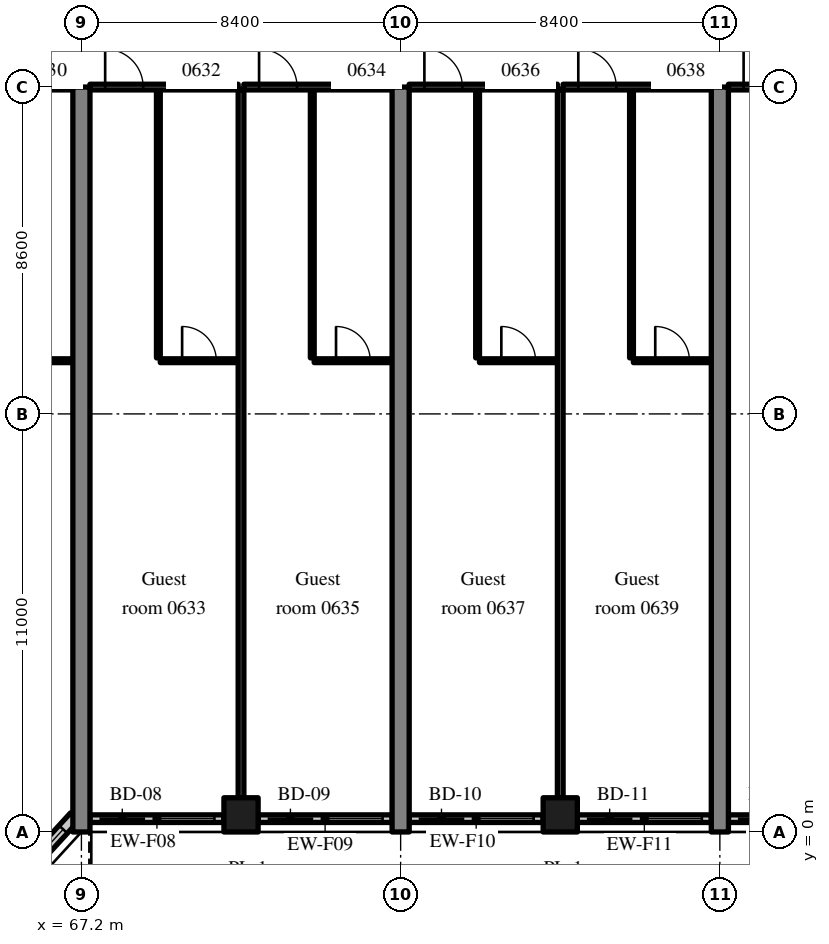
"""IFC4 building model, lengths in metres.
Left out: names, types, materials, properties, quantities, classifications, styles, units other than length and angle.
Written with IfcOpenShell. Run it as: python <this file> out.ifc"""

import sys

from ifc_helpers import new_model, si_unit, direction, frame, frame_2d, origin, origin_2d, place, context, subcontext, project, spatial, rectangle, extrude, source, transform, mapped, element, fill, save


model = new_model("IFC4")
c1 = context("Model", 3, precision=1e-05, world=origin(), true_north=direction((0.0, 1.0)))
c2 = subcontext(c1, "Body", "Model", "MODEL_VIEW")
j1 = project(units=[si_unit("LENGTHUNIT", "METRE"), si_unit("PLANEANGLEUNIT", "RADIAN")], contexts=[c1])
p1 = place(None, origin())
s1 = spatial("IfcSite", under=j1, at=p1, CompositionType="ELEMENT")
p2 = place(p1, origin())
s2 = spatial("IfcBuilding", under=s1, at=p2, CompositionType="ELEMENT")
p3 = place(p2, frame((0.0, 0.0, 31.6)))
s3 = spatial("IfcBuildingStorey", under=s2, at=p3, CompositionType="ELEMENT", Elevation=31.6)
m1 = source(origin(), c2, "Body", "SweptSolid", [
    extrude(rectangle(XDim=19.6, YDim=0.45, at=frame_2d((9.8, 0.0))), origin(), (0.0, 0.0, 1.0), 3.52),
])
for number, where, z_axis, x_axis in (
    (1, (67.2, 0.0, 0.0), (0.0, 0.0, 1.0), (0.0, 1.0, 0.0)),
    (2, (75.6, 0.0, 0.0), (0.0, 0.0, 1.0), (0.0, 1.0, 0.0)),
    (3, (84.0, 0.0, 0.0), (0.0, 0.0, 1.0), (0.0, 1.0, 0.0)),
):
    element("IfcWall", number, at=place(p3, frame(where, z_axis=z_axis, x_axis=x_axis)), inside=s3, PredefinedType="SHEAR", context=c2, shape_type="MappedRepresentation", body=[
        mapped(m1, transform((0.0, 0.0, 0.0), scale=1.0)),
    ])
m2 = source(origin(), c2, "Body", "SweptSolid", [
    extrude(rectangle(XDim=0.9, YDim=0.9, at=origin_2d()), origin(), (0.0, 0.0, 1.0), 3.52),
])
for number, where, z_axis, x_axis in (
    (4, (71.4, 0.45, 0.0), (0.0, 0.0, 1.0), (1.0, 0.0, 0.0)),
    (5, (79.8, 0.45, 0.0), (0.0, 0.0, 1.0), (1.0, 0.0, 0.0)),
):
    element("IfcColumn", number, at=place(p3, frame(where, z_axis=z_axis, x_axis=x_axis)), inside=s3, PredefinedType="COLUMN", context=c2, shape_type="MappedRepresentation", body=[
        mapped(m2, transform((0.0, 0.0, 0.0), scale=1.0)),
    ])
m3 = source(origin(), c2, "Body", "SweptSolid", [
    extrude(rectangle(XDim=2.398, YDim=0.3, at=frame_2d((1.199, 0.0))), origin(), (0.0, 0.0, 1.0), 3.52),
])
p4 = place(p3, frame((65.404, -1.369, 0.0), z_axis=(0.0, 0.0, 1.0), x_axis=(0.675374189419, 0.737475222815, 0.0)))
e6 = element("IfcWall", 6, at=p4, inside=s3, PredefinedType="SOLIDWALL", context=c2, shape_type="MappedRepresentation", body=[
    mapped(m3, transform((0.0, 0.0, 0.0), scale=1.0)),
])
m4 = source(origin(), c2, "Body", "SweptSolid", [
    extrude(rectangle(XDim=1.5, YDim=2.0, at=frame_2d((0.75, 1.0))), frame((0.0, 0.16, 0.0), z_axis=(0.0, -1.0, 0.0), x_axis=(1.0, 0.0, 0.0)), (0.0, 0.0, 1.0), 0.32),
])
p5 = place(p4, frame((0.449, 0.0, 0.9)))
e7 = element("IfcOpeningElement", 7, at=p5, cuts=e6, PredefinedType="OPENING", context=c2, shape_type="MappedRepresentation", body=[
    mapped(m4, transform((0.0, 0.0, 0.0), scale=1.0)),
])
m5 = source(origin(), c2, "Body", "SweptSolid", [
    extrude(rectangle(XDim=3.525, YDim=0.2, at=frame_2d((1.762, 0.0))), origin(), (0.0, 0.0, 1.0), 2.77),
])
p6 = place(p3, frame((67.425, 0.35, 0.0), z_axis=(0.0, 0.0, 1.0), x_axis=(1.0, 0.0, 0.0)))
e8 = element("IfcWall", 8, at=p6, inside=s3, PredefinedType="SOLIDWALL", context=c2, shape_type="MappedRepresentation", body=[
    mapped(m5, transform((0.0, 0.0, 0.0), scale=1.0)),
])
m6 = source(origin(), c2, "Body", "SweptSolid", [
    extrude(rectangle(XDim=1.2, YDim=2.4, at=frame_2d((0.6, 1.2))), frame((0.0, 0.11, 0.0), z_axis=(0.0, -1.0, 0.0), x_axis=(1.0, 0.0, 0.0)), (0.0, 0.0, 1.0), 0.22),
])
p7 = place(p6, frame((0.25, 0.0, 0.0)))
e9 = element("IfcOpeningElement", 9, at=p7, cuts=e8, PredefinedType="OPENING", context=c2, shape_type="MappedRepresentation", body=[
    mapped(m6, transform((0.0, 0.0, 0.0), scale=1.0)),
])
m7 = source(origin(), c2, "Body", "SweptSolid", [
    extrude(rectangle(XDim=1.5, YDim=1.5, at=frame_2d((0.75, 0.75))), frame((0.0, 0.11, 0.0), z_axis=(0.0, -1.0, 0.0), x_axis=(1.0, 0.0, 0.0)), (0.0, 0.0, 1.0), 0.22),
])
p8 = place(p6, frame((1.775, 0.0, 0.9)))
e10 = element("IfcOpeningElement", 10, at=p8, cuts=e8, PredefinedType="OPENING", context=c2, shape_type="MappedRepresentation", body=[
    mapped(m7, transform((0.0, 0.0, 0.0), scale=1.0)),
])
p9 = place(p3, frame((71.85, 0.35, 0.0), z_axis=(0.0, 0.0, 1.0), x_axis=(1.0, 0.0, 0.0)))
e11 = element("IfcWall", 11, at=p9, inside=s3, PredefinedType="SOLIDWALL", context=c2, shape_type="MappedRepresentation", body=[
    mapped(m5, transform((0.0, 0.0, 0.0), scale=1.0)),
])
p10 = place(p9, frame((0.25, 0.0, 0.0)))
e12 = element("IfcOpeningElement", 12, at=p10, cuts=e11, PredefinedType="OPENING", context=c2, shape_type="MappedRepresentation", body=[
    mapped(m6, transform((0.0, 0.0, 0.0), scale=1.0)),
])
p11 = place(p9, frame((1.775, 0.0, 0.9)))
e13 = element("IfcOpeningElement", 13, at=p11, cuts=e11, PredefinedType="OPENING", context=c2, shape_type="MappedRepresentation", body=[
    mapped(m7, transform((0.0, 0.0, 0.0), scale=1.0)),
])
m8 = source(origin(), c2, "Body", "SweptSolid", [
    extrude(rectangle(XDim=3.525, YDim=0.2, at=frame_2d((1.763, 0.0))), origin(), (0.0, 0.0, 1.0), 2.77),
])
p12 = place(p3, frame((75.825, 0.35, 0.0), z_axis=(0.0, 0.0, 1.0), x_axis=(1.0, 0.0, 0.0)))
e14 = element("IfcWall", 14, at=p12, inside=s3, PredefinedType="SOLIDWALL", context=c2, shape_type="MappedRepresentation", body=[
    mapped(m8, transform((0.0, 0.0, 0.0), scale=1.0)),
])
p13 = place(p12, frame((0.25, 0.0, 0.0)))
e15 = element("IfcOpeningElement", 15, at=p13, cuts=e14, PredefinedType="OPENING", context=c2, shape_type="MappedRepresentation", body=[
    mapped(m6, transform((0.0, 0.0, 0.0), scale=1.0)),
])
p14 = place(p12, frame((1.775, 0.0, 0.9)))
e16 = element("IfcOpeningElement", 16, at=p14, cuts=e14, PredefinedType="OPENING", context=c2, shape_type="MappedRepresentation", body=[
    mapped(m7, transform((0.0, 0.0, 0.0), scale=1.0)),
])
p15 = place(p3, frame((80.25, 0.35, 0.0), z_axis=(0.0, 0.0, 1.0), x_axis=(1.0, 0.0, 0.0)))
e17 = element("IfcWall", 17, at=p15, inside=s3, PredefinedType="SOLIDWALL", context=c2, shape_type="MappedRepresentation", body=[
    mapped(m5, transform((0.0, 0.0, 0.0), scale=1.0)),
])
p16 = place(p15, frame((0.25, 0.0, 0.0)))
e18 = element("IfcOpeningElement", 18, at=p16, cuts=e17, PredefinedType="OPENING", context=c2, shape_type="MappedRepresentation", body=[
    mapped(m6, transform((0.0, 0.0, 0.0), scale=1.0)),
])
p17 = place(p15, frame((1.775, 0.0, 0.9)))
e19 = element("IfcOpeningElement", 19, at=p17, cuts=e17, PredefinedType="OPENING", context=c2, shape_type="MappedRepresentation", body=[
    mapped(m7, transform((0.0, 0.0, 0.0), scale=1.0)),
])
p18 = place(p3, frame((84.225, 0.35, 0.0), z_axis=(0.0, 0.0, 1.0), x_axis=(1.0, 0.0, 0.0)))
e20 = element("IfcWall", 20, at=p18, inside=s3, PredefinedType="SOLIDWALL", context=c2, shape_type="MappedRepresentation", body=[
    mapped(m5, transform((0.0, 0.0, 0.0), scale=1.0)),
])
p19 = place(p18, frame((0.25, 0.0, 0.0)))
e21 = element("IfcOpeningElement", 21, at=p19, cuts=e20, PredefinedType="OPENING", context=c2, shape_type="MappedRepresentation", body=[
    mapped(m6, transform((0.0, 0.0, 0.0), scale=1.0)),
])
p20 = place(p18, frame((1.775, 0.0, 0.9)))
e22 = element("IfcOpeningElement", 22, at=p20, cuts=e20, PredefinedType="OPENING", context=c2, shape_type="MappedRepresentation", body=[
    mapped(m7, transform((0.0, 0.0, 0.0), scale=1.0)),
])
m9 = source(origin(), c2, "Body", "SweptSolid", [
    extrude(rectangle(XDim=2.05, YDim=0.1, at=frame_2d((1.025, 0.0))), origin(), (0.0, 0.0, 1.0), 3.52),
])
p21 = place(p3, frame((64.925, 12.4, 0.0), z_axis=(0.0, 0.0, 1.0), x_axis=(1.0, 0.0, 0.0)))
e23 = element("IfcWall", 23, at=p21, inside=s3, PredefinedType="PARTITIONING", context=c2, shape_type="MappedRepresentation", body=[
    mapped(m9, transform((0.0, 0.0, 0.0), scale=1.0)),
])
m10 = source(origin(), c2, "Body", "SweptSolid", [
    extrude(rectangle(XDim=0.9, YDim=2.1, at=frame_2d((0.45, 1.05))), frame((0.0, 0.06, 0.0), z_axis=(0.0, -1.0, 0.0), x_axis=(1.0, 0.0, 0.0)), (0.0, 0.0, 1.0), 0.12),
])
p22 = place(p21, frame((0.575, 0.0, 0.0)))
e24 = element("IfcOpeningElement", 24, at=p22, cuts=e23, PredefinedType="OPENING", context=c2, shape_type="MappedRepresentation", body=[
    mapped(m10, transform((0.0, 0.0, 0.0), scale=1.0)),
])
m11 = source(origin(), c2, "Body", "SweptSolid", [
    extrude(rectangle(XDim=3.9, YDim=0.15, at=frame_2d((1.95, 0.0))), origin(), (0.0, 0.0, 1.0), 2.82),
])
p23 = place(p3, frame((63.075, 19.6, 0.0), z_axis=(0.0, 0.0, 1.0), x_axis=(1.0, 0.0, 0.0)))
e25 = element("IfcWall", 25, at=p23, inside=s3, PredefinedType="PARTITIONING", context=c2, shape_type="MappedRepresentation", body=[
    mapped(m11, transform((0.0, 0.0, 0.0), scale=1.0)),
])
m12 = source(origin(), c2, "Body", "SweptSolid", [
    extrude(rectangle(XDim=1.0, YDim=2.1, at=frame_2d((0.5, 1.05))), frame((0.0, 0.085, 0.0), z_axis=(0.0, -1.0, 0.0), x_axis=(1.0, 0.0, 0.0)), (0.0, 0.0, 1.0), 0.17),
])
p24 = place(p23, frame((0.4, 0.0, 0.0)))
e26 = element("IfcOpeningElement", 26, at=p24, cuts=e25, PredefinedType="OPENING", context=c2, shape_type="MappedRepresentation", body=[
    mapped(m12, transform((0.0, 0.0, 0.0), scale=1.0)),
])
m13 = source(origin(), c2, "Body", "SweptSolid", [
    extrude(rectangle(XDim=7.05, YDim=0.1, at=frame_2d((3.525, 0.0))), origin(), (0.0, 0.0, 1.0), 3.52),
])
p25 = place(p3, frame((69.225, 12.475, 0.0), z_axis=(0.0, 0.0, 1.0), x_axis=(0.0, 1.0, 0.0)))
e27 = element("IfcWall", 27, at=p25, inside=s3, PredefinedType="PARTITIONING", context=c2, shape_type="MappedRepresentation", body=[
    mapped(m13, transform((0.0, 0.0, 0.0), scale=1.0)),
])
p26 = place(p3, frame((69.275, 12.4, 0.0), z_axis=(0.0, 0.0, 1.0), x_axis=(1.0, 0.0, 0.0)))
e28 = element("IfcWall", 28, at=p26, inside=s3, PredefinedType="PARTITIONING", context=c2, shape_type="MappedRepresentation", body=[
    mapped(m9, transform((0.0, 0.0, 0.0), scale=1.0)),
])
p27 = place(p26, frame((0.575, 0.0, 0.0)))
e29 = element("IfcOpeningElement", 29, at=p27, cuts=e28, PredefinedType="OPENING", context=c2, shape_type="MappedRepresentation", body=[
    mapped(m10, transform((0.0, 0.0, 0.0), scale=1.0)),
])
m14 = source(origin(), c2, "Body", "SweptSolid", [
    extrude(rectangle(XDim=3.9, YDim=0.15, at=frame_2d((1.95, 0.0))), origin(), (0.0, 0.0, 1.0), 2.82),
])
p28 = place(p3, frame((67.425, 19.6, 0.0), z_axis=(0.0, 0.0, 1.0), x_axis=(1.0, 0.0, 0.0)))
e30 = element("IfcWall", 30, at=p28, inside=s3, PredefinedType="PARTITIONING", context=c2, shape_type="MappedRepresentation", body=[
    mapped(m14, transform((0.0, 0.0, 0.0), scale=1.0)),
])
p29 = place(p28, frame((0.4, 0.0, 0.0)))
e31 = element("IfcOpeningElement", 31, at=p29, cuts=e30, PredefinedType="OPENING", context=c2, shape_type="MappedRepresentation", body=[
    mapped(m12, transform((0.0, 0.0, 0.0), scale=1.0)),
])
p30 = place(p3, frame((73.275, 12.475, 0.0), z_axis=(0.0, 0.0, 1.0), x_axis=(0.0, 1.0, 0.0)))
e32 = element("IfcWall", 32, at=p30, inside=s3, PredefinedType="PARTITIONING", context=c2, shape_type="MappedRepresentation", body=[
    mapped(m13, transform((0.0, 0.0, 0.0), scale=1.0)),
])
p31 = place(p3, frame((73.325, 12.4, 0.0), z_axis=(0.0, 0.0, 1.0), x_axis=(1.0, 0.0, 0.0)))
e33 = element("IfcWall", 33, at=p31, inside=s3, PredefinedType="PARTITIONING", context=c2, shape_type="MappedRepresentation", body=[
    mapped(m9, transform((0.0, 0.0, 0.0), scale=1.0)),
])
p32 = place(p31, frame((0.575, 0.0, 0.0)))
e34 = element("IfcOpeningElement", 34, at=p32, cuts=e33, PredefinedType="OPENING", context=c2, shape_type="MappedRepresentation", body=[
    mapped(m10, transform((0.0, 0.0, 0.0), scale=1.0)),
])
p33 = place(p3, frame((71.475, 19.6, 0.0), z_axis=(0.0, 0.0, 1.0), x_axis=(1.0, 0.0, 0.0)))
e35 = element("IfcWall", 35, at=p33, inside=s3, PredefinedType="PARTITIONING", context=c2, shape_type="MappedRepresentation", body=[
    mapped(m14, transform((0.0, 0.0, 0.0), scale=1.0)),
])
p34 = place(p33, frame((0.4, 0.0, 0.0)))
e36 = element("IfcOpeningElement", 36, at=p34, cuts=e35, PredefinedType="OPENING", context=c2, shape_type="MappedRepresentation", body=[
    mapped(m12, transform((0.0, 0.0, 0.0), scale=1.0)),
])
m15 = source(origin(), c2, "Body", "SweptSolid", [
    extrude(rectangle(XDim=18.625, YDim=0.15, at=frame_2d((9.312, 0.0))), origin(), (0.0, 0.0, 1.0), 3.52),
])
p35 = place(p3, frame((71.4, 0.9, 0.0), z_axis=(0.0, 0.0, 1.0), x_axis=(0.0, 1.0, 0.0)))
e37 = element("IfcWall", 37, at=p35, inside=s3, PredefinedType="PARTITIONING", context=c2, shape_type="MappedRepresentation", body=[
    mapped(m15, transform((0.0, 0.0, 0.0), scale=1.0)),
])
p36 = place(p3, frame((77.625, 12.475, 0.0), z_axis=(0.0, 0.0, 1.0), x_axis=(0.0, 1.0, 0.0)))
e38 = element("IfcWall", 38, at=p36, inside=s3, PredefinedType="PARTITIONING", context=c2, shape_type="MappedRepresentation", body=[
    mapped(m13, transform((0.0, 0.0, 0.0), scale=1.0)),
])
p37 = place(p3, frame((77.675, 12.4, 0.0), z_axis=(0.0, 0.0, 1.0), x_axis=(1.0, 0.0, 0.0)))
e39 = element("IfcWall", 39, at=p37, inside=s3, PredefinedType="PARTITIONING", context=c2, shape_type="MappedRepresentation", body=[
    mapped(m9, transform((0.0, 0.0, 0.0), scale=1.0)),
])
p38 = place(p37, frame((0.575, 0.0, 0.0)))
e40 = element("IfcOpeningElement", 40, at=p38, cuts=e39, PredefinedType="OPENING", context=c2, shape_type="MappedRepresentation", body=[
    mapped(m10, transform((0.0, 0.0, 0.0), scale=1.0)),
])
p39 = place(p3, frame((75.825, 19.6, 0.0), z_axis=(0.0, 0.0, 1.0), x_axis=(1.0, 0.0, 0.0)))
e41 = element("IfcWall", 41, at=p39, inside=s3, PredefinedType="PARTITIONING", context=c2, shape_type="MappedRepresentation", body=[
    mapped(m11, transform((0.0, 0.0, 0.0), scale=1.0)),
])
p40 = place(p39, frame((0.4, 0.0, 0.0)))
e42 = element("IfcOpeningElement", 42, at=p40, cuts=e41, PredefinedType="OPENING", context=c2, shape_type="MappedRepresentation", body=[
    mapped(m12, transform((0.0, 0.0, 0.0), scale=1.0)),
])
p41 = place(p3, frame((81.675, 12.475, 0.0), z_axis=(0.0, 0.0, 1.0), x_axis=(0.0, 1.0, 0.0)))
e43 = element("IfcWall", 43, at=p41, inside=s3, PredefinedType="PARTITIONING", context=c2, shape_type="MappedRepresentation", body=[
    mapped(m13, transform((0.0, 0.0, 0.0), scale=1.0)),
])
m16 = source(origin(), c2, "Body", "SweptSolid", [
    extrude(rectangle(XDim=2.05, YDim=0.1, at=frame_2d((1.025, 0.0))), origin(), (0.0, 0.0, 1.0), 3.52),
])
p42 = place(p3, frame((81.725, 12.4, 0.0), z_axis=(0.0, 0.0, 1.0), x_axis=(1.0, 0.0, 0.0)))
e44 = element("IfcWall", 44, at=p42, inside=s3, PredefinedType="PARTITIONING", context=c2, shape_type="MappedRepresentation", body=[
    mapped(m16, transform((0.0, 0.0, 0.0), scale=1.0)),
])
p43 = place(p42, frame((0.575, 0.0, 0.0)))
e45 = element("IfcOpeningElement", 45, at=p43, cuts=e44, PredefinedType="OPENING", context=c2, shape_type="MappedRepresentation", body=[
    mapped(m10, transform((0.0, 0.0, 0.0), scale=1.0)),
])
p44 = place(p3, frame((79.875, 19.6, 0.0), z_axis=(0.0, 0.0, 1.0), x_axis=(1.0, 0.0, 0.0)))
e46 = element("IfcWall", 46, at=p44, inside=s3, PredefinedType="PARTITIONING", context=c2, shape_type="MappedRepresentation", body=[
    mapped(m14, transform((0.0, 0.0, 0.0), scale=1.0)),
])
p45 = place(p44, frame((0.4, 0.0, 0.0)))
e47 = element("IfcOpeningElement", 47, at=p45, cuts=e46, PredefinedType="OPENING", context=c2, shape_type="MappedRepresentation", body=[
    mapped(m12, transform((0.0, 0.0, 0.0), scale=1.0)),
])
p46 = place(p3, frame((79.8, 0.9, 0.0), z_axis=(0.0, 0.0, 1.0), x_axis=(0.0, 1.0, 0.0)))
e48 = element("IfcWall", 48, at=p46, inside=s3, PredefinedType="PARTITIONING", context=c2, shape_type="MappedRepresentation", body=[
    mapped(m15, transform((0.0, 0.0, 0.0), scale=1.0)),
])
p47 = place(p3, frame((84.225, 19.6, 0.0), z_axis=(0.0, 0.0, 1.0), x_axis=(1.0, 0.0, 0.0)))
e49 = element("IfcWall", 49, at=p47, inside=s3, PredefinedType="PARTITIONING", context=c2, shape_type="MappedRepresentation", body=[
    mapped(m14, transform((0.0, 0.0, 0.0), scale=1.0)),
])
p48 = place(p47, frame((0.4, 0.0, 0.0)))
e50 = element("IfcOpeningElement", 50, at=p48, cuts=e49, PredefinedType="OPENING", context=c2, shape_type="MappedRepresentation", body=[
    mapped(m12, transform((0.0, 0.0, 0.0), scale=1.0)),
])
m17 = source(origin(), c2, "Body", "SweptSolid", [
    extrude(rectangle(XDim=1.5, YDim=2.0, at=frame_2d((0.75, 1.0))), frame((0.0, 0.03, 0.0), z_axis=(0.0, -1.0, 0.0), x_axis=(1.0, 0.0, 0.0)), (0.0, 0.0, 1.0), 0.06),
])
p49 = place(p5, origin())
e51 = element("IfcWindow", 51, at=p49, inside=s3, PartitioningType="SINGLE_PANEL", PredefinedType="WINDOW", context=c2, shape_type="MappedRepresentation", body=[
    mapped(m17, transform((0.0, 0.0, 0.0), scale=1.0)),
])
fill(e7, e51)
m18 = source(origin(), c2, "Body", "SweptSolid", [
    extrude(rectangle(XDim=1.2, YDim=2.4, at=frame_2d((0.6, 1.2))), frame((0.0, 0.025, 0.0), z_axis=(0.0, -1.0, 0.0), x_axis=(1.0, 0.0, 0.0)), (0.0, 0.0, 1.0), 0.05),
])
p50 = place(p7, origin())
e52 = element("IfcDoor", 52, at=p50, inside=s3, OperationType="SLIDING_TO_RIGHT", PredefinedType="DOOR", context=c2, shape_type="MappedRepresentation", body=[
    mapped(m18, transform((0.0, 0.0, 0.0), scale=1.0)),
])
fill(e9, e52)
m19 = source(origin(), c2, "Body", "SweptSolid", [
    extrude(rectangle(XDim=1.5, YDim=1.5, at=frame_2d((0.75, 0.75))), frame((0.0, 0.03, 0.0), z_axis=(0.0, -1.0, 0.0), x_axis=(1.0, 0.0, 0.0)), (0.0, 0.0, 1.0), 0.06),
])
p51 = place(p8, origin())
e53 = element("IfcWindow", 53, at=p51, inside=s3, PartitioningType="SINGLE_PANEL", PredefinedType="WINDOW", context=c2, shape_type="MappedRepresentation", body=[
    mapped(m19, transform((0.0, 0.0, 0.0), scale=1.0)),
])
fill(e10, e53)
p52 = place(p10, origin())
e54 = element("IfcDoor", 54, at=p52, inside=s3, OperationType="SLIDING_TO_LEFT", PredefinedType="DOOR", context=c2, shape_type="MappedRepresentation", body=[
    mapped(m18, transform((0.0, 0.0, 0.0), scale=1.0)),
])
fill(e12, e54)
p53 = place(p11, origin())
e55 = element("IfcWindow", 55, at=p53, inside=s3, PartitioningType="SINGLE_PANEL", PredefinedType="WINDOW", context=c2, shape_type="MappedRepresentation", body=[
    mapped(m19, transform((0.0, 0.0, 0.0), scale=1.0)),
])
fill(e13, e55)
p54 = place(p13, origin())
e56 = element("IfcDoor", 56, at=p54, inside=s3, OperationType="SLIDING_TO_RIGHT", PredefinedType="DOOR", context=c2, shape_type="MappedRepresentation", body=[
    mapped(m18, transform((0.0, 0.0, 0.0), scale=1.0)),
])
fill(e15, e56)
p55 = place(p14, origin())
e57 = element("IfcWindow", 57, at=p55, inside=s3, PartitioningType="SINGLE_PANEL", PredefinedType="WINDOW", context=c2, shape_type="MappedRepresentation", body=[
    mapped(m19, transform((0.0, 0.0, 0.0), scale=1.0)),
])
fill(e16, e57)
p56 = place(p16, origin())
e58 = element("IfcDoor", 58, at=p56, inside=s3, OperationType="SLIDING_TO_LEFT", PredefinedType="DOOR", context=c2, shape_type="MappedRepresentation", body=[
    mapped(m18, transform((0.0, 0.0, 0.0), scale=1.0)),
])
fill(e18, e58)
p57 = place(p17, origin())
e59 = element("IfcWindow", 59, at=p57, inside=s3, PartitioningType="SINGLE_PANEL", PredefinedType="WINDOW", context=c2, shape_type="MappedRepresentation", body=[
    mapped(m19, transform((0.0, 0.0, 0.0), scale=1.0)),
])
fill(e19, e59)
p58 = place(p19, origin())
e60 = element("IfcDoor", 60, at=p58, inside=s3, OperationType="SLIDING_TO_RIGHT", PredefinedType="DOOR", context=c2, shape_type="MappedRepresentation", body=[
    mapped(m18, transform((0.0, 0.0, 0.0), scale=1.0)),
])
fill(e21, e60)
m20 = source(origin(), c2, "Body", "SweptSolid", [
    extrude(rectangle(XDim=0.9, YDim=2.1, at=frame_2d((0.45, 1.05))), frame((0.0, 0.025, 0.0), z_axis=(0.0, -1.0, 0.0), x_axis=(1.0, 0.0, 0.0)), (0.0, 0.0, 1.0), 0.05),
])
p59 = place(p27, origin())
e61 = element("IfcDoor", 61, at=p59, inside=s3, OperationType="SINGLE_SWING_LEFT", PredefinedType="DOOR", context=c2, shape_type="MappedRepresentation", body=[
    mapped(m20, transform((0.0, 0.0, 0.0), scale=1.0)),
])
fill(e29, e61)
m21 = source(origin(), c2, "Body", "SweptSolid", [
    extrude(rectangle(XDim=1.0, YDim=2.1, at=frame_2d((0.5, 1.05))), frame((0.0, 0.025, 0.0), z_axis=(0.0, -1.0, 0.0), x_axis=(1.0, 0.0, 0.0)), (0.0, 0.0, 1.0), 0.05),
])
p60 = place(p29, origin())
e62 = element("IfcDoor", 62, at=p60, inside=s3, OperationType="SINGLE_SWING_LEFT", PredefinedType="DOOR", context=c2, shape_type="MappedRepresentation", body=[
    mapped(m21, transform((0.0, 0.0, 0.0), scale=1.0)),
])
fill(e31, e62)
p61 = place(p32, origin())
e63 = element("IfcDoor", 63, at=p61, inside=s3, OperationType="SINGLE_SWING_LEFT", PredefinedType="DOOR", context=c2, shape_type="MappedRepresentation", body=[
    mapped(m20, transform((0.0, 0.0, 0.0), scale=1.0)),
])
fill(e34, e63)
p62 = place(p34, origin())
e64 = element("IfcDoor", 64, at=p62, inside=s3, OperationType="SINGLE_SWING_LEFT", PredefinedType="DOOR", context=c2, shape_type="MappedRepresentation", body=[
    mapped(m21, transform((0.0, 0.0, 0.0), scale=1.0)),
])
fill(e36, e64)
p63 = place(p38, origin())
e65 = element("IfcDoor", 65, at=p63, inside=s3, OperationType="SINGLE_SWING_LEFT", PredefinedType="DOOR", context=c2, shape_type="MappedRepresentation", body=[
    mapped(m20, transform((0.0, 0.0, 0.0), scale=1.0)),
])
fill(e40, e65)
p64 = place(p40, origin())
e66 = element("IfcDoor", 66, at=p64, inside=s3, OperationType="SINGLE_SWING_LEFT", PredefinedType="DOOR", context=c2, shape_type="MappedRepresentation", body=[
    mapped(m21, transform((0.0, 0.0, 0.0), scale=1.0)),
])
fill(e42, e66)
p65 = place(p43, origin())
e67 = element("IfcDoor", 67, at=p65, inside=s3, OperationType="SINGLE_SWING_LEFT", PredefinedType="DOOR", context=c2, shape_type="MappedRepresentation", body=[
    mapped(m20, transform((0.0, 0.0, 0.0), scale=1.0)),
])
fill(e45, e67)
p66 = place(p45, origin())
e68 = element("IfcDoor", 68, at=p66, inside=s3, OperationType="SINGLE_SWING_LEFT", PredefinedType="DOOR", context=c2, shape_type="MappedRepresentation", body=[
    mapped(m21, transform((0.0, 0.0, 0.0), scale=1.0)),
])
fill(e47, e68)
p67 = place(p48, origin())
e69 = element("IfcDoor", 69, at=p67, inside=s3, OperationType="SINGLE_SWING_LEFT", PredefinedType="DOOR", context=c2, shape_type="MappedRepresentation", body=[
    mapped(m21, transform((0.0, 0.0, 0.0), scale=1.0)),
])
fill(e50, e69)
save(model, sys.argv[1])
